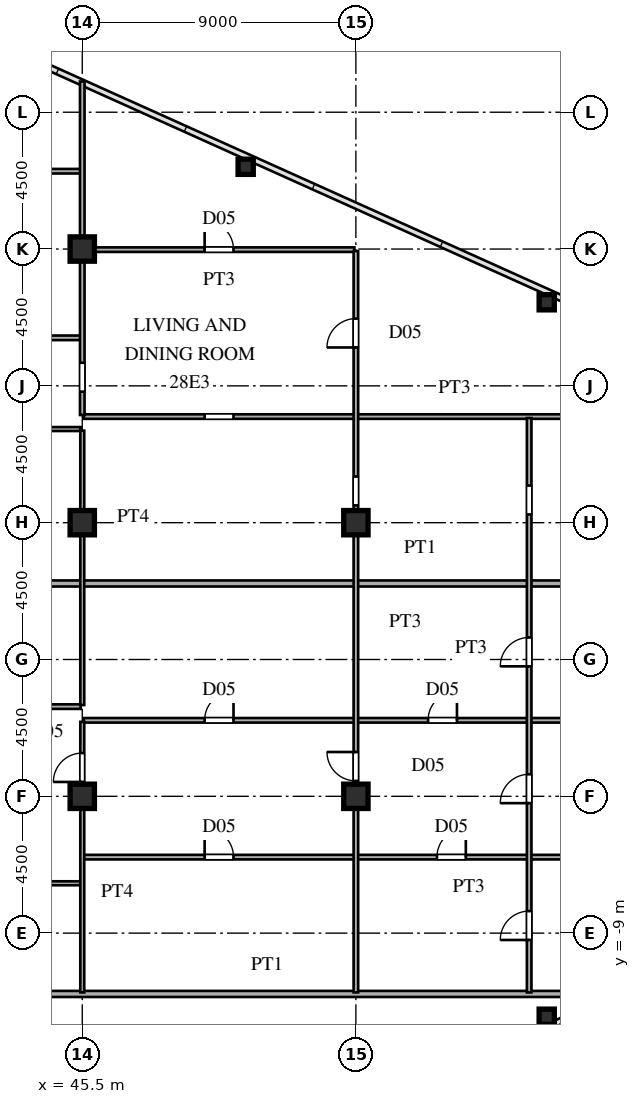
"""IFC4 building model, lengths in metres.
Left out: names, types, materials, properties, quantities, classifications, styles, units other than length and angle.
Written with IfcOpenShell. Run it as: python <this file> out.ifc"""

import sys

from ifc_helpers import new_model, si_unit, direction, frame, frame_2d, origin, origin_2d, place, context, subcontext, project, spatial, rectangle, hollow_rectangle, i_section, extrude, source, transform, mapped, element, fill, save


model = new_model("IFC4")
c1 = context("Model", 3, precision=1e-05, world=origin(), true_north=direction((0.0, 1.0)))
c2 = subcontext(c1, "Body", "Model", "MODEL_VIEW")
j1 = project(units=[si_unit("LENGTHUNIT", "METRE"), si_unit("PLANEANGLEUNIT", "RADIAN")], contexts=[c1])
p1 = place(None, origin())
s1 = spatial("IfcSite", under=j1, at=p1, CompositionType="ELEMENT")
p2 = place(p1, origin())
s2 = spatial("IfcBuilding", under=s1, at=p2, CompositionType="ELEMENT")
p3 = place(p2, frame((0.0, 0.0, 106.8)))
s3 = spatial("IfcBuildingStorey", under=s2, at=p3, CompositionType="ELEMENT", Elevation=106.8)
m1 = source(origin(), c2, "Body", "SweptSolid", [
    extrude(i_section(OverallWidth=0.8, OverallDepth=0.8, WebThickness=0.032, FlangeThickness=0.05, at=origin_2d()), origin(), (0.0, 0.0, 1.0), 3.6),
])
for number, where, z_axis, x_axis in (
    (1, (45.5, -4.5, 0.0), (0.0, 0.0, 1.0), (1.0, 0.0, 0.0)),
    (2, (45.5, 4.5, 0.0), (0.0, 0.0, 1.0), (1.0, 0.0, 0.0)),
    (3, (45.5, 13.5, 0.0), (0.0, 0.0, 1.0), (1.0, 0.0, 0.0)),
    (4, (54.5, -4.5, 0.0), (0.0, 0.0, 1.0), (1.0, 0.0, 0.0)),
    (5, (54.5, 4.5, 0.0), (0.0, 0.0, 1.0), (1.0, 0.0, 0.0)),
):
    element("IfcColumn", number, at=place(p3, frame(where, z_axis=z_axis, x_axis=x_axis)), inside=s3, PredefinedType="COLUMN", context=c2, shape_type="MappedRepresentation", body=[
        mapped(m1, transform((0.0, 0.0, 0.0), scale=1.0)),
    ])
m2 = source(origin(), c2, "Body", "SweptSolid", [
    extrude(hollow_rectangle(XDim=0.5, YDim=0.5, WallThickness=0.02, at=origin_2d()), origin(), (0.0, 0.0, 1.0), 3.6),
])
for number, where, z_axis, x_axis in (
    (6, (60.778, -11.749, 0.0), (0.0, 0.0, 1.0), (1.0, 0.0, 0.0)),
    (7, (50.875, 16.205, 0.0), (0.0, 0.0, 1.0), (1.0, 0.0, 0.0)),
    (8, (60.778, 11.749, 0.0), (0.0, 0.0, 1.0), (1.0, 0.0, 0.0)),
):
    element("IfcColumn", number, at=place(p3, frame(where, z_axis=z_axis, x_axis=x_axis)), inside=s3, PredefinedType="COLUMN", context=c2, shape_type="MappedRepresentation", body=[
        mapped(m2, transform((0.0, 0.0, 0.0), scale=1.0)),
    ])
p4 = place(p3, frame((39.93, -11.0, 0.0), z_axis=(0.0, 0.0, 1.0), x_axis=(1.0, 0.0, 0.0)))
e9 = element("IfcWall", 9, at=p4, inside=s3, PredefinedType="PARTITIONING", context=c2, shape_type="SweptSolid", body=[
    extrude(rectangle(XDim=23.304, YDim=0.2, at=frame_2d((11.652, 0.0))), origin(), (0.0, 0.0, 1.0), 3.38),
])
p5 = place(p3, frame((39.9, -7.36, 0.0), z_axis=(0.0, 0.0, 1.0), x_axis=(1.0, 0.0, 0.0)))
e10 = element("IfcWall", 10, at=p5, inside=s3, PredefinedType="PARTITIONING", context=c2, shape_type="SweptSolid", body=[
    extrude(rectangle(XDim=5.55, YDim=0.13, at=frame_2d((2.775, 0.0))), origin(), (0.0, 0.0, 1.0), 3.38),
])
p6 = place(p5, frame((2.335, 0.0, 0.0)))
e11 = element("IfcOpeningElement", 11, at=p6, cuts=e10, PredefinedType="OPENING", context=c2, shape_type="SweptSolid", body=[
    extrude(rectangle(XDim=0.88, YDim=2.1, at=frame_2d((0.44, 1.05))), frame((0.0, 0.075, 0.0), z_axis=(0.0, -1.0, 0.0), x_axis=(1.0, 0.0, 0.0)), (0.0, 0.0, 1.0), 0.15),
])
p7 = place(p3, frame((45.55, -6.5, 0.0), z_axis=(0.0, 0.0, 1.0), x_axis=(1.0, 0.0, 0.0)))
e12 = element("IfcWall", 12, at=p7, inside=s3, PredefinedType="PARTITIONING", context=c2, shape_type="SweptSolid", body=[
    extrude(rectangle(XDim=25.325, YDim=0.15, at=frame_2d((12.663, 0.0))), origin(), (0.0, 0.0, 1.0), 3.38),
])
p8 = place(p7, frame((3.975, 0.0, 0.0)))
e13 = element("IfcOpeningElement", 13, at=p8, cuts=e12, PredefinedType="OPENING", context=c2, shape_type="SweptSolid", body=[
    extrude(rectangle(XDim=0.95, YDim=2.15, at=frame_2d((0.475, 1.075))), frame((0.0, 0.085, 0.0), z_axis=(0.0, -1.0, 0.0), x_axis=(1.0, 0.0, 0.0)), (0.0, 0.0, 1.0), 0.17),
])
p9 = place(p7, frame((11.617, 0.0, 0.0)))
e14 = element("IfcOpeningElement", 14, at=p9, cuts=e12, PredefinedType="OPENING", context=c2, shape_type="SweptSolid", body=[
    extrude(rectangle(XDim=0.95, YDim=2.15, at=frame_2d((0.475, 1.075))), frame((0.0, 0.085, 0.0), z_axis=(0.0, -1.0, 0.0), x_axis=(1.0, 0.0, 0.0)), (0.0, 0.0, 1.0), 0.17),
])
p10 = place(p3, frame((45.55, -2.0, 0.0), z_axis=(0.0, 0.0, 1.0), x_axis=(1.0, 0.0, 0.0)))
e15 = element("IfcWall", 15, at=p10, inside=s3, PredefinedType="PARTITIONING", context=c2, shape_type="SweptSolid", body=[
    extrude(rectangle(XDim=25.485, YDim=0.15, at=frame_2d((12.742, 0.0))), origin(), (0.0, 0.0, 1.0), 3.38),
])
p11 = place(p10, frame((3.975, 0.0, 0.0)))
e16 = element("IfcOpeningElement", 16, at=p11, cuts=e15, PredefinedType="OPENING", context=c2, shape_type="SweptSolid", body=[
    extrude(rectangle(XDim=0.95, YDim=2.15, at=frame_2d((0.475, 1.075))), frame((0.0, 0.085, 0.0), z_axis=(0.0, -1.0, 0.0), x_axis=(1.0, 0.0, 0.0)), (0.0, 0.0, 1.0), 0.17),
])
p12 = place(p10, frame((11.325, 0.0, 0.0)))
e17 = element("IfcOpeningElement", 17, at=p12, cuts=e15, PredefinedType="OPENING", context=c2, shape_type="SweptSolid", body=[
    extrude(rectangle(XDim=0.95, YDim=2.15, at=frame_2d((0.475, 1.075))), frame((0.0, 0.085, 0.0), z_axis=(0.0, -1.0, 0.0), x_axis=(1.0, 0.0, 0.0)), (0.0, 0.0, 1.0), 0.17),
])
p13 = place(p3, frame((39.9, -1.55, 0.0), z_axis=(0.0, 0.0, 1.0), x_axis=(1.0, 0.0, 0.0)))
e18 = element("IfcWall", 18, at=p13, inside=s3, PredefinedType="PARTITIONING", context=c2, shape_type="SweptSolid", body=[
    extrude(rectangle(XDim=5.55, YDim=0.15, at=frame_2d((2.775, 0.0))), origin(), (0.0, 0.0, 1.0), 3.38),
])
p14 = place(p13, frame((2.3, 0.0, 0.0)))
e19 = element("IfcOpeningElement", 19, at=p14, cuts=e18, PredefinedType="OPENING", context=c2, shape_type="SweptSolid", body=[
    extrude(rectangle(XDim=0.95, YDim=2.15, at=frame_2d((0.475, 1.075))), frame((0.0, 0.085, 0.0), z_axis=(0.0, -1.0, 0.0), x_axis=(1.0, 0.0, 0.0)), (0.0, 0.0, 1.0), 0.17),
])
p15 = place(p3, frame((39.93, 2.5, 0.0), z_axis=(0.0, 0.0, 1.0), x_axis=(1.0, 0.0, 0.0)))
e20 = element("IfcWall", 20, at=p15, inside=s3, PredefinedType="PARTITIONING", context=c2, shape_type="SweptSolid", body=[
    extrude(rectangle(XDim=31.075, YDim=0.2, at=frame_2d((15.538, 0.0))), origin(), (0.0, 0.0, 1.0), 3.38),
])
p16 = place(p3, frame((39.9, 7.58, 0.0), z_axis=(0.0, 0.0, 1.0), x_axis=(1.0, 0.0, 0.0)))
e21 = element("IfcWall", 21, at=p16, inside=s3, PredefinedType="PARTITIONING", context=c2, shape_type="SweptSolid", body=[
    extrude(rectangle(XDim=5.55, YDim=0.13, at=frame_2d((2.775, 0.0))), origin(), (0.0, 0.0, 1.0), 3.38),
])
p17 = place(p16, frame((2.335, 0.0, 0.0)))
e22 = element("IfcOpeningElement", 22, at=p17, cuts=e21, PredefinedType="OPENING", context=c2, shape_type="SweptSolid", body=[
    extrude(rectangle(XDim=0.88, YDim=2.1, at=frame_2d((0.44, 1.05))), frame((0.0, 0.075, 0.0), z_axis=(0.0, -1.0, 0.0), x_axis=(1.0, 0.0, 0.0)), (0.0, 0.0, 1.0), 0.15),
])
p18 = place(p3, frame((45.55, 7.99, 0.0), z_axis=(0.0, 0.0, 1.0), x_axis=(1.0, 0.0, 0.0)))
e23 = element("IfcWall", 23, at=p18, inside=s3, PredefinedType="PARTITIONING", context=c2, shape_type="SweptSolid", body=[
    extrude(rectangle(XDim=24.392, YDim=0.15, at=frame_2d((12.196, 0.0))), origin(), (0.0, 0.0, 1.0), 3.38),
])
p19 = place(p18, frame((3.975, 0.0, 0.0)))
e24 = element("IfcOpeningElement", 24, at=p19, cuts=e23, PredefinedType="OPENING", context=c2, shape_type="SweptSolid", body=[
    extrude(rectangle(XDim=0.95, YDim=2.15, at=frame_2d((0.475, 1.075))), frame((0.0, 0.085, 0.0), z_axis=(0.0, -1.0, 0.0), x_axis=(1.0, 0.0, 0.0)), (0.0, 0.0, 1.0), 0.17),
])
p20 = place(p3, frame((39.9, 10.58, 0.0), z_axis=(0.0, 0.0, 1.0), x_axis=(1.0, 0.0, 0.0)))
e25 = element("IfcWall", 25, at=p20, inside=s3, PredefinedType="PARTITIONING", context=c2, shape_type="SweptSolid", body=[
    extrude(rectangle(XDim=5.55, YDim=0.15, at=frame_2d((2.775, 0.0))), origin(), (0.0, 0.0, 1.0), 3.38),
])
p21 = place(p20, frame((2.3, 0.0, 0.0)))
e26 = element("IfcOpeningElement", 26, at=p21, cuts=e25, PredefinedType="OPENING", context=c2, shape_type="SweptSolid", body=[
    extrude(rectangle(XDim=0.95, YDim=2.15, at=frame_2d((0.475, 1.075))), frame((0.0, 0.085, 0.0), z_axis=(0.0, -1.0, 0.0), x_axis=(1.0, 0.0, 0.0)), (0.0, 0.0, 1.0), 0.17),
])
p22 = place(p3, frame((45.55, 13.48, 0.0), z_axis=(0.0, 0.0, 1.0), x_axis=(1.0, 0.0, 0.0)))
e27 = element("IfcWall", 27, at=p22, inside=s3, PredefinedType="PARTITIONING", context=c2, shape_type="SweptSolid", body=[
    extrude(rectangle(XDim=1.424, YDim=0.15, at=frame_2d((0.712, 0.0))), origin(), (0.0, 0.0, 1.0), 2.08),
])
p23 = place(p3, frame((46.974, 13.48, 0.0), z_axis=(0.0, 0.0, 1.0), x_axis=(1.0, 0.0, 0.0)))
e28 = element("IfcWall", 28, at=p23, inside=s3, PredefinedType="PARTITIONING", context=c2, shape_type="SweptSolid", body=[
    extrude(rectangle(XDim=7.476, YDim=0.15, at=frame_2d((3.738, 0.0))), origin(), (0.0, 0.0, 1.0), 3.38),
])
p24 = place(p23, frame((2.551, 0.0, 0.0)))
e29 = element("IfcOpeningElement", 29, at=p24, cuts=e28, PredefinedType="OPENING", context=c2, shape_type="SweptSolid", body=[
    extrude(rectangle(XDim=0.95, YDim=2.15, at=frame_2d((0.475, 1.075))), frame((0.0, 0.085, 0.0), z_axis=(0.0, -1.0, 0.0), x_axis=(1.0, 0.0, 0.0)), (0.0, 0.0, 1.0), 0.17),
])
p25 = place(p3, frame((39.85, 16.06, 0.0), z_axis=(0.0, 0.0, 1.0), x_axis=(1.0, 0.0, 0.0)))
e30 = element("IfcWall", 30, at=p25, inside=s3, PredefinedType="PARTITIONING", context=c2, shape_type="SweptSolid", body=[
    extrude(rectangle(XDim=5.6, YDim=0.15, at=frame_2d((2.8, 0.0))), origin(), (0.0, 0.0, 1.0), 3.38),
])
p26 = place(p25, frame((2.325, 0.0, 0.0)))
e31 = element("IfcOpeningElement", 31, at=p26, cuts=e30, PredefinedType="OPENING", context=c2, shape_type="SweptSolid", body=[
    extrude(rectangle(XDim=0.95, YDim=2.15, at=frame_2d((0.475, 1.075))), frame((0.0, 0.085, 0.0), z_axis=(0.0, -1.0, 0.0), x_axis=(1.0, 0.0, 0.0)), (0.0, 0.0, 1.0), 0.17),
])
p27 = place(p3, frame((45.5, -10.95, 0.0), z_axis=(0.0, 0.0, 1.0), x_axis=(0.0, 1.0, 0.0)))
e32 = element("IfcWall", 32, at=p27, inside=s3, PredefinedType="PARTITIONING", context=c2, shape_type="SweptSolid", body=[
    extrude(rectangle(XDim=8.9, YDim=0.13, at=frame_2d((4.45, 0.0))), origin(), (0.0, 0.0, 1.0), 2.78),
])
p28 = place(p27, frame((6.923, 0.0, 0.0)))
e33 = element("IfcOpeningElement", 33, at=p28, cuts=e32, PredefinedType="OPENING", context=c2, shape_type="SweptSolid", body=[
    extrude(rectangle(XDim=0.95, YDim=2.15, at=frame_2d((0.475, 1.075))), frame((0.0, 0.075, 0.0), z_axis=(0.0, -1.0, 0.0), x_axis=(1.0, 0.0, 0.0)), (0.0, 0.0, 1.0), 0.15),
])
p29 = place(p3, frame((45.5, -1.498, 0.0), z_axis=(0.0, 0.0, 1.0), x_axis=(0.0, 1.0, 0.0)))
e34 = element("IfcWall", 34, at=p29, inside=s3, PredefinedType="PARTITIONING", context=c2, shape_type="SweptSolid", body=[
    extrude(rectangle(XDim=9.025, YDim=0.13, at=frame_2d((4.513, 0.0))), origin(), (0.0, 0.0, 1.0), 2.78),
])
p30 = place(p3, frame((45.5, 8.042, 0.0), z_axis=(0.0, 0.0, 1.0), x_axis=(0.0, 1.0, 0.0)))
e35 = element("IfcWall", 35, at=p30, inside=s3, PredefinedType="PARTITIONING", context=c2, shape_type="SweptSolid", body=[
    extrude(rectangle(XDim=10.968, YDim=0.15, at=frame_2d((5.484, 0.0))), origin(), (0.0, 0.0, 1.0), 2.78),
])
p31 = place(p30, frame((0.768, 0.0, 0.0)))
e36 = element("IfcOpeningElement", 36, at=p31, cuts=e35, PredefinedType="OPENING", context=c2, shape_type="SweptSolid", body=[
    extrude(rectangle(XDim=0.95, YDim=2.15, at=frame_2d((0.475, 1.075))), frame((0.0, 0.085, 0.0), z_axis=(0.0, -1.0, 0.0), x_axis=(1.0, 0.0, 0.0)), (0.0, 0.0, 1.0), 0.17),
])
p32 = place(p3, frame((54.5, -10.95, 0.0), z_axis=(0.0, 0.0, 1.0), x_axis=(0.0, 1.0, 0.0)))
e37 = element("IfcWall", 37, at=p32, inside=s3, PredefinedType="PARTITIONING", context=c2, shape_type="SweptSolid", body=[
    extrude(rectangle(XDim=24.383, YDim=0.15, at=frame_2d((12.191, 0.0))), origin(), (0.0, 0.0, 1.0), 2.78),
])
p33 = place(p32, frame((6.957, 0.0, 0.0)))
e38 = element("IfcOpeningElement", 38, at=p33, cuts=e37, PredefinedType="OPENING", context=c2, shape_type="SweptSolid", body=[
    extrude(rectangle(XDim=0.95, YDim=2.15, at=frame_2d((0.475, 1.075))), frame((0.0, 0.085, 0.0), z_axis=(0.0, -1.0, 0.0), x_axis=(1.0, 0.0, 0.0)), (0.0, 0.0, 1.0), 0.17),
])
p34 = place(p32, frame((21.212, 0.0, 0.0)))
e39 = element("IfcOpeningElement", 39, at=p34, cuts=e37, PredefinedType="OPENING", context=c2, shape_type="SweptSolid", body=[
    extrude(rectangle(XDim=0.95, YDim=2.15, at=frame_2d((0.475, 1.075))), frame((0.0, 0.085, 0.0), z_axis=(0.0, -1.0, 0.0), x_axis=(1.0, 0.0, 0.0)), (0.0, 0.0, 1.0), 0.17),
])
p35 = place(p32, frame((16.018, 0.0, 0.0)))
e40 = element("IfcOpeningElement", 40, at=p35, cuts=e37, PredefinedType="OPENING", context=c2, shape_type="SweptSolid", body=[
    extrude(rectangle(XDim=0.95, YDim=2.15, at=frame_2d((0.475, 1.075))), frame((0.0, 0.085, 0.0), z_axis=(0.0, -1.0, 0.0), x_axis=(1.0, 0.0, 0.0)), (0.0, 0.0, 1.0), 0.17),
])
p36 = place(p3, frame((60.2, -10.95, 0.0), z_axis=(0.0, 0.0, 1.0), x_axis=(0.0, 1.0, 0.0)))
e41 = element("IfcWall", 41, at=p36, inside=s3, PredefinedType="PARTITIONING", context=c2, shape_type="SweptSolid", body=[
    extrude(rectangle(XDim=18.892, YDim=0.15, at=frame_2d((9.446, 0.0))), origin(), (0.0, 0.0, 1.0), 3.38),
])
p37 = place(p36, frame((1.725, 0.0, 0.0)))
e42 = element("IfcOpeningElement", 42, at=p37, cuts=e41, PredefinedType="OPENING", context=c2, shape_type="SweptSolid", body=[
    extrude(rectangle(XDim=0.95, YDim=2.15, at=frame_2d((0.475, 1.075))), frame((0.0, 0.085, 0.0), z_axis=(0.0, -1.0, 0.0), x_axis=(1.0, 0.0, 0.0)), (0.0, 0.0, 1.0), 0.17),
])
p38 = place(p36, frame((6.225, 0.0, 0.0)))
e43 = element("IfcOpeningElement", 43, at=p38, cuts=e41, PredefinedType="OPENING", context=c2, shape_type="SweptSolid", body=[
    extrude(rectangle(XDim=0.95, YDim=2.15, at=frame_2d((0.475, 1.075))), frame((0.0, 0.085, 0.0), z_axis=(0.0, -1.0, 0.0), x_axis=(1.0, 0.0, 0.0)), (0.0, 0.0, 1.0), 0.17),
])
p39 = place(p36, frame((10.725, 0.0, 0.0)))
e44 = element("IfcOpeningElement", 44, at=p39, cuts=e41, PredefinedType="OPENING", context=c2, shape_type="SweptSolid", body=[
    extrude(rectangle(XDim=0.95, YDim=2.15, at=frame_2d((0.475, 1.075))), frame((0.0, 0.085, 0.0), z_axis=(0.0, -1.0, 0.0), x_axis=(1.0, 0.0, 0.0)), (0.0, 0.0, 1.0), 0.17),
])
p40 = place(p36, frame((15.721, 0.0, 0.0)))
e45 = element("IfcOpeningElement", 45, at=p40, cuts=e41, PredefinedType="OPENING", context=c2, shape_type="SweptSolid", body=[
    extrude(rectangle(XDim=0.95, YDim=2.15, at=frame_2d((0.475, 1.075))), frame((0.0, 0.085, 0.0), z_axis=(0.0, -1.0, 0.0), x_axis=(1.0, 0.0, 0.0)), (0.0, 0.0, 1.0), 0.17),
])
m3 = source(origin(), c2, "Body", "SweptSolid", [
    extrude(rectangle(XDim=0.95, YDim=2.15, at=frame_2d((0.475, 1.075))), frame((0.0, 0.025, 0.0), z_axis=(0.0, -1.0, 0.0), x_axis=(1.0, 0.0, 0.0)), (0.0, 0.0, 1.0), 0.05),
])
p41 = place(p8, origin())
e46 = element("IfcDoor", 46, at=p41, inside=s3, OperationType="SINGLE_SWING_LEFT", PredefinedType="DOOR", context=c2, shape_type="MappedRepresentation", body=[
    mapped(m3, transform((0.0, 0.0, 0.0), scale=1.0)),
])
fill(e13, e46)
p42 = place(p9, origin())
e47 = element("IfcDoor", 47, at=p42, inside=s3, OperationType="SINGLE_SWING_RIGHT", PredefinedType="DOOR", context=c2, shape_type="MappedRepresentation", body=[
    mapped(m3, transform((0.0, 0.0, 0.0), scale=1.0)),
])
fill(e14, e47)
p43 = place(p11, origin())
e48 = element("IfcDoor", 48, at=p43, inside=s3, OperationType="SINGLE_SWING_RIGHT", PredefinedType="DOOR", context=c2, shape_type="MappedRepresentation", body=[
    mapped(m3, transform((0.0, 0.0, 0.0), scale=1.0)),
])
fill(e16, e48)
p44 = place(p12, origin())
e49 = element("IfcDoor", 49, at=p44, inside=s3, OperationType="SINGLE_SWING_RIGHT", PredefinedType="DOOR", context=c2, shape_type="MappedRepresentation", body=[
    mapped(m3, transform((0.0, 0.0, 0.0), scale=1.0)),
])
fill(e17, e49)
p45 = place(p24, origin())
e50 = element("IfcDoor", 50, at=p45, inside=s3, OperationType="SINGLE_SWING_LEFT", PredefinedType="DOOR", context=c2, shape_type="MappedRepresentation", body=[
    mapped(m3, transform((0.0, 0.0, 0.0), scale=1.0)),
])
fill(e29, e50)
p46 = place(p28, origin())
e51 = element("IfcDoor", 51, at=p46, inside=s3, OperationType="SINGLE_SWING_LEFT", PredefinedType="DOOR", context=c2, shape_type="MappedRepresentation", body=[
    mapped(m3, transform((0.0, 0.0, 0.0), scale=1.0)),
])
fill(e33, e51)
p47 = place(p33, origin())
e52 = element("IfcDoor", 52, at=p47, inside=s3, OperationType="SINGLE_SWING_RIGHT", PredefinedType="DOOR", context=c2, shape_type="MappedRepresentation", body=[
    mapped(m3, transform((0.0, 0.0, 0.0), scale=1.0)),
])
fill(e38, e52)
p48 = place(p34, origin())
e53 = element("IfcDoor", 53, at=p48, inside=s3, OperationType="SINGLE_SWING_LEFT", PredefinedType="DOOR", context=c2, shape_type="MappedRepresentation", body=[
    mapped(m3, transform((0.0, 0.0, 0.0), scale=1.0)),
])
fill(e39, e53)
p49 = place(p37, origin())
e54 = element("IfcDoor", 54, at=p49, inside=s3, OperationType="SINGLE_SWING_LEFT", PredefinedType="DOOR", context=c2, shape_type="MappedRepresentation", body=[
    mapped(m3, transform((0.0, 0.0, 0.0), scale=1.0)),
])
fill(e42, e54)
p50 = place(p38, origin())
e55 = element("IfcDoor", 55, at=p50, inside=s3, OperationType="SINGLE_SWING_LEFT", PredefinedType="DOOR", context=c2, shape_type="MappedRepresentation", body=[
    mapped(m3, transform((0.0, 0.0, 0.0), scale=1.0)),
])
fill(e43, e55)
p51 = place(p39, origin())
e56 = element("IfcDoor", 56, at=p51, inside=s3, OperationType="SINGLE_SWING_LEFT", PredefinedType="DOOR", context=c2, shape_type="MappedRepresentation", body=[
    mapped(m3, transform((0.0, 0.0, 0.0), scale=1.0)),
])
fill(e44, e56)
save(model, sys.argv[1])
